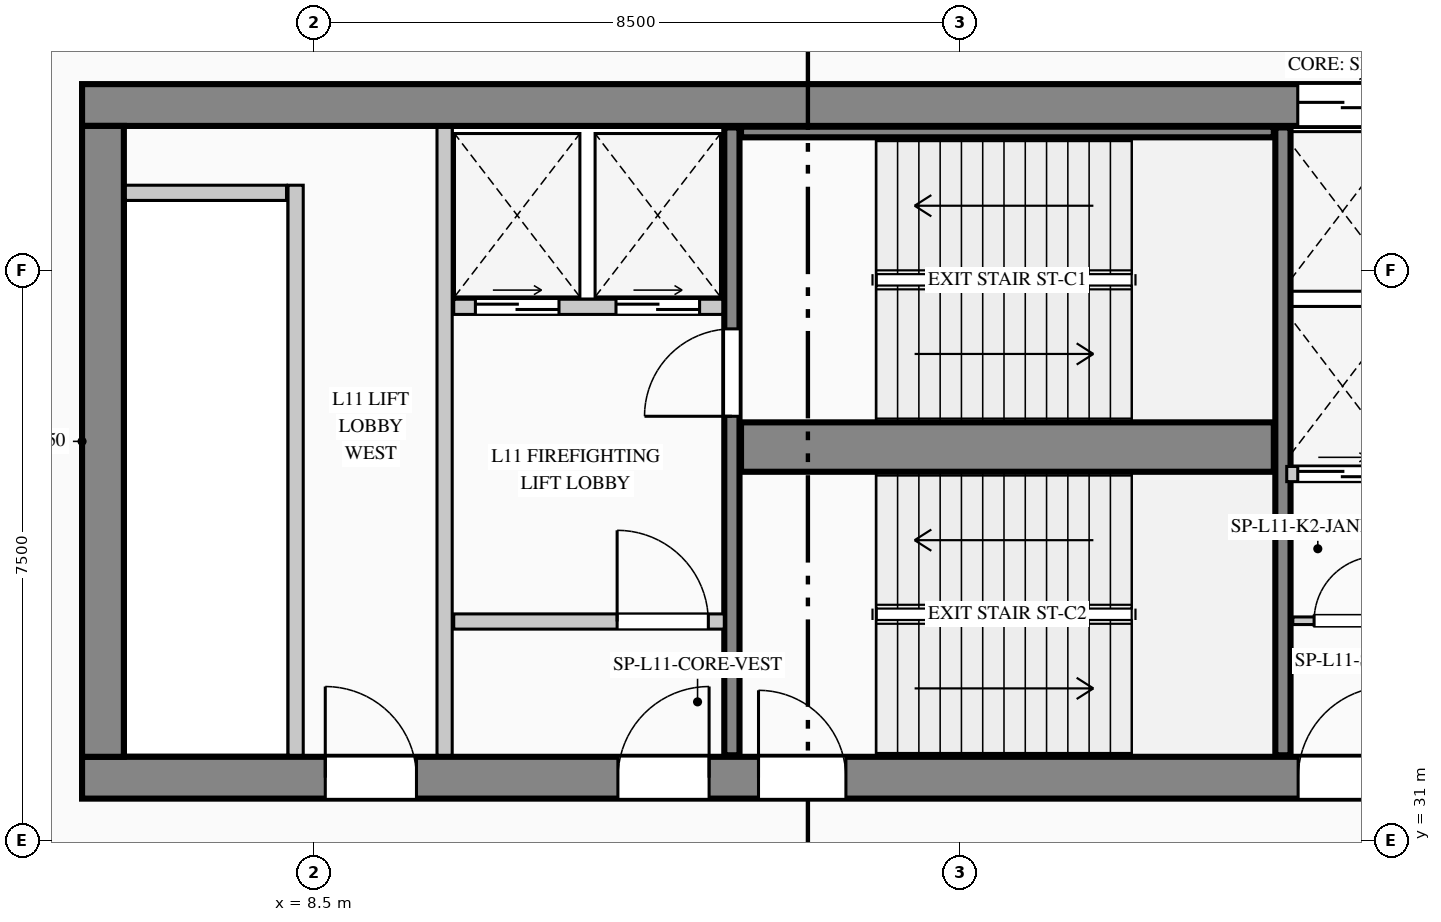
"""IFC4 building model, lengths in metres.
Left out: names, types, materials, properties, quantities, classifications, styles, units other than length and angle.
Written with IfcOpenShell. Run it as: python <this file> out.ifc"""

import sys

from ifc_helpers import new_model, si_unit, direction, frame, frame_2d, origin, place, context, subcontext, project, spatial, rectangle, extrude, element, fill, save


model = new_model("IFC4")
c1 = context("Model", 3, precision=1e-05, world=origin(), true_north=direction((0.0, 1.0)))
c2 = subcontext(c1, "Body", "Model", "MODEL_VIEW")
j1 = project(units=[si_unit("LENGTHUNIT", "METRE"), si_unit("PLANEANGLEUNIT", "RADIAN")], contexts=[c1])
p1 = place(None, origin())
s1 = spatial("IfcSite", under=j1, at=p1, CompositionType="ELEMENT")
p2 = place(p1, origin())
s2 = spatial("IfcBuilding", under=s1, at=p2, CompositionType="ELEMENT")
p3 = place(p2, frame((0.0, 0.0, 49.0)))
s3 = spatial("IfcBuildingStorey", under=s2, at=p3, CompositionType="ELEMENT", Elevation=49.0)
p4 = place(p3, frame((5.45, 40.675, 0.0), z_axis=(0.0, 0.0, 1.0), x_axis=(1.0, 0.0, 0.0)))
e1 = element("IfcWall", 1, at=p4, inside=s3, PredefinedType="SHEAR", context=c2, shape_type="SweptSolid", body=[
    extrude(rectangle(XDim=17.95, YDim=0.55, at=frame_2d((8.975, 0.0))), origin(), (0.0, 0.0, 1.0), 4.4),
])
p5 = place(p4, frame((15.995, 0.0, 0.0)))
e2 = element("IfcOpeningElement", 2, at=p5, cuts=e1, PredefinedType="OPENING", context=c2, shape_type="SweptSolid", body=[
    extrude(rectangle(XDim=1.18, YDim=2.25, at=frame_2d((0.59, 1.125))), frame((0.0, 0.285, 0.0), z_axis=(0.0, -1.0, 0.0), x_axis=(1.0, 0.0, 0.0)), (0.0, 0.0, 1.0), 0.57),
])
p6 = place(p3, frame((5.45, 31.825, 0.0), z_axis=(0.0, 0.0, 1.0), x_axis=(1.0, 0.0, 0.0)))
e3 = element("IfcWall", 3, at=p6, inside=s3, PredefinedType="SHEAR", context=c2, shape_type="SweptSolid", body=[
    extrude(rectangle(XDim=17.95, YDim=0.55, at=frame_2d((8.975, 0.0))), origin(), (0.0, 0.0, 1.0), 4.4),
])
p7 = place(p6, frame((3.2, 0.0, 0.0)))
e4 = element("IfcOpeningElement", 4, at=p7, cuts=e3, PredefinedType="OPENING", context=c2, shape_type="SweptSolid", body=[
    extrude(rectangle(XDim=1.2, YDim=2.2, at=frame_2d((0.6, 1.1))), frame((0.0, 0.285, 0.0), z_axis=(0.0, -1.0, 0.0), x_axis=(1.0, 0.0, 0.0)), (0.0, 0.0, 1.0), 0.57),
])
p8 = place(p6, frame((7.05, 0.0, 0.0)))
e5 = element("IfcOpeningElement", 5, at=p8, cuts=e3, PredefinedType="OPENING", context=c2, shape_type="SweptSolid", body=[
    extrude(rectangle(XDim=1.2, YDim=2.2, at=frame_2d((0.6, 1.1))), frame((0.0, 0.285, 0.0), z_axis=(0.0, -1.0, 0.0), x_axis=(1.0, 0.0, 0.0)), (0.0, 0.0, 1.0), 0.57),
])
p9 = place(p6, frame((8.9, 0.0, 0.0)))
e6 = element("IfcOpeningElement", 6, at=p9, cuts=e3, PredefinedType="OPENING", context=c2, shape_type="SweptSolid", body=[
    extrude(rectangle(XDim=1.15, YDim=2.2, at=frame_2d((0.575, 1.1))), frame((0.0, 0.285, 0.0), z_axis=(0.0, -1.0, 0.0), x_axis=(1.0, 0.0, 0.0)), (0.0, 0.0, 1.0), 0.57),
])
p10 = place(p6, frame((16.0, 0.0, 0.0)))
e7 = element("IfcOpeningElement", 7, at=p10, cuts=e3, PredefinedType="OPENING", context=c2, shape_type="SweptSolid", body=[
    extrude(rectangle(XDim=1.2, YDim=2.2, at=frame_2d((0.6, 1.1))), frame((0.0, 0.285, 0.0), z_axis=(0.0, -1.0, 0.0), x_axis=(1.0, 0.0, 0.0)), (0.0, 0.0, 1.0), 0.57),
])
p11 = place(p3, frame((5.725, 32.1, 0.0), z_axis=(0.0, 0.0, 1.0), x_axis=(0.0, 1.0, 0.0)))
e8 = element("IfcWall", 8, at=p11, inside=s3, PredefinedType="SHEAR", context=c2, shape_type="SweptSolid", body=[
    extrude(rectangle(XDim=8.3, YDim=0.55, at=frame_2d((4.15, 0.0))), origin(), (0.0, 0.0, 1.0), 4.4),
])
p12 = place(p3, frame((14.0, 32.12, 0.0), z_axis=(0.0, 0.0, 1.0), x_axis=(0.0, 1.0, 0.0)))
e9 = element("IfcWall", 9, at=p12, inside=s3, PredefinedType="SHEAR", context=c2, shape_type="SweptSolid", body=[
    extrude(rectangle(XDim=8.26, YDim=0.2, at=frame_2d((4.13, 0.0))), origin(), (0.0, 0.0, 1.0), 4.4),
])
p13 = place(p12, frame((4.46, 0.0, 0.0)))
e10 = element("IfcOpeningElement", 10, at=p13, cuts=e9, PredefinedType="OPENING", context=c2, shape_type="SweptSolid", body=[
    extrude(rectangle(XDim=1.15, YDim=2.2, at=frame_2d((0.575, 1.1))), frame((0.0, 0.11, 0.0), z_axis=(0.0, -1.0, 0.0), x_axis=(1.0, 0.0, 0.0)), (0.0, 0.0, 1.0), 0.22),
])
p14 = place(p3, frame((14.12, 36.175, 0.0), z_axis=(0.0, 0.0, 1.0), x_axis=(1.0, 0.0, 0.0)))
e11 = element("IfcWall", 11, at=p14, inside=s3, PredefinedType="SHEAR", context=c2, shape_type="SweptSolid", body=[
    extrude(rectangle(XDim=7.01, YDim=0.65, at=frame_2d((3.505, 0.0))), origin(), (0.0, 0.0, 1.0), 4.4),
])
p15 = place(p3, frame((21.25, 32.12, 0.0), z_axis=(0.0, 0.0, 1.0), x_axis=(0.0, 1.0, 0.0)))
e12 = element("IfcWall", 12, at=p15, inside=s3, PredefinedType="SHEAR", context=c2, shape_type="SweptSolid", body=[
    extrude(rectangle(XDim=8.26, YDim=0.2, at=frame_2d((4.13, 0.0))), origin(), (0.0, 0.0, 1.0), 4.4),
])
p16 = place(p3, frame((14.12, 40.32, 0.0), z_axis=(0.0, 0.0, 1.0), x_axis=(1.0, 0.0, 0.0)))
e13 = element("IfcWall", 13, at=p16, inside=s3, PredefinedType="SHEAR", context=c2, shape_type="SweptSolid", body=[
    extrude(rectangle(XDim=7.01, YDim=0.14, at=frame_2d((3.505, 0.0))), origin(), (0.0, 0.0, 1.0), 4.4),
])
p17 = place(p3, frame((8.523, 4.84, 0.0), z_axis=(0.0, 0.0, 1.0), x_axis=(-0.150394554312, 0.988626055712, 0.0)))
e14 = element("IfcWall", 14, at=p17, inside=s3, PredefinedType="STANDARD", context=c2, shape_type="SweptSolid", body=[
    extrude(rectangle(XDim=36.738, YDim=0.28, at=frame_2d((18.369, 0.0))), origin(), (0.0, 0.0, 1.0), 4.1),
])
p18 = place(p17, frame((22.762, 0.0, 0.9)))
e15 = element("IfcOpeningElement", 15, at=p18, cuts=e14, PredefinedType="OPENING", context=c2, shape_type="SweptSolid", body=[
    extrude(rectangle(XDim=1.5, YDim=1.8, at=frame_2d((0.75, 0.9))), frame((0.0, 0.15, 0.0), z_axis=(0.0, -1.0, 0.0), x_axis=(1.0, 0.0, 0.0)), (0.0, 0.0, 1.0), 0.3),
])
p19 = place(p3, frame((8.26, 32.12, 0.0), z_axis=(0.0, 0.0, 1.0), x_axis=(0.0, 1.0, 0.0)))
e16 = element("IfcWall", 16, at=p19, inside=s3, PredefinedType="PARTITIONING", context=c2, shape_type="SweptSolid", body=[
    extrude(rectangle(XDim=7.5, YDim=0.2, at=frame_2d((3.75, 0.0))), origin(), (0.0, 0.0, 1.0), 4.1),
])
p20 = place(p3, frame((6.02, 39.52, 0.0), z_axis=(0.0, 0.0, 1.0), x_axis=(1.0, 0.0, 0.0)))
e17 = element("IfcWall", 17, at=p20, inside=s3, PredefinedType="PARTITIONING", context=c2, shape_type="SweptSolid", body=[
    extrude(rectangle(XDim=2.12, YDim=0.2, at=frame_2d((1.06, 0.0))), origin(), (0.0, 0.0, 1.0), 4.1),
])
p21 = place(p3, frame((10.22, 32.12, 0.0), z_axis=(0.0, 0.0, 1.0), x_axis=(0.0, 1.0, 0.0)))
e18 = element("IfcWall", 18, at=p21, inside=s3, PredefinedType="PARTITIONING", context=c2, shape_type="SweptSolid", body=[
    extrude(rectangle(XDim=8.26, YDim=0.2, at=frame_2d((4.13, 0.0))), origin(), (0.0, 0.0, 1.0), 4.1),
])
p22 = place(p3, frame((10.34, 38.02, 0.0), z_axis=(0.0, 0.0, 1.0), x_axis=(1.0, 0.0, 0.0)))
e19 = element("IfcWall", 19, at=p22, inside=s3, PredefinedType="PARTITIONING", context=c2, shape_type="SweptSolid", body=[
    extrude(rectangle(XDim=3.54, YDim=0.2, at=frame_2d((1.77, 0.0))), origin(), (0.0, 0.0, 1.0), 4.1),
])
p23 = place(p22, frame((0.285, 0.0, 0.0)))
e20 = element("IfcOpeningElement", 20, at=p23, cuts=e19, PredefinedType="OPENING", context=c2, shape_type="SweptSolid", body=[
    extrude(rectangle(XDim=1.1, YDim=2.2, at=frame_2d((0.55, 1.1))), frame((0.0, 0.11, 0.0), z_axis=(0.0, -1.0, 0.0), x_axis=(1.0, 0.0, 0.0)), (0.0, 0.0, 1.0), 0.22),
])
p24 = place(p22, frame((2.135, 0.0, 0.0)))
e21 = element("IfcOpeningElement", 21, at=p24, cuts=e19, PredefinedType="OPENING", context=c2, shape_type="SweptSolid", body=[
    extrude(rectangle(XDim=1.1, YDim=2.2, at=frame_2d((0.55, 1.1))), frame((0.0, 0.11, 0.0), z_axis=(0.0, -1.0, 0.0), x_axis=(1.0, 0.0, 0.0)), (0.0, 0.0, 1.0), 0.22),
])
p25 = place(p3, frame((10.34, 33.88, 0.0), z_axis=(0.0, 0.0, 1.0), x_axis=(1.0, 0.0, 0.0)))
e22 = element("IfcWall", 22, at=p25, inside=s3, PredefinedType="PARTITIONING", context=c2, shape_type="SweptSolid", body=[
    extrude(rectangle(XDim=3.56, YDim=0.2, at=frame_2d((1.78, 0.0))), origin(), (0.0, 0.0, 1.0), 4.1),
])
p26 = place(p25, frame((2.15, 0.0, 0.0)))
e23 = element("IfcOpeningElement", 23, at=p26, cuts=e22, PredefinedType="OPENING", context=c2, shape_type="SweptSolid", body=[
    extrude(rectangle(XDim=1.2, YDim=2.2, at=frame_2d((0.6, 1.1))), frame((0.0, 0.11, 0.0), z_axis=(0.0, -1.0, 0.0), x_axis=(1.0, 0.0, 0.0)), (0.0, 0.0, 1.0), 0.22),
])
p27 = place(p3, frame((21.38, 33.89, 0.0), z_axis=(0.0, 0.0, 1.0), x_axis=(1.0, 0.0, 0.0)))
e24 = element("IfcWall", 24, at=p27, inside=s3, PredefinedType="PARTITIONING", context=c2, shape_type="SweptSolid", body=[
    extrude(rectangle(XDim=1.42, YDim=0.1, at=frame_2d((0.71, 0.0))), origin(), (0.0, 0.0, 1.0), 4.1),
])
p28 = place(p27, frame((0.28, 0.0, 0.0)))
e25 = element("IfcOpeningElement", 25, at=p28, cuts=e24, PredefinedType="OPENING", context=c2, shape_type="SweptSolid", body=[
    extrude(rectangle(XDim=0.85, YDim=2.1, at=frame_2d((0.425, 1.05))), frame((0.0, 0.06, 0.0), z_axis=(0.0, -1.0, 0.0), x_axis=(1.0, 0.0, 0.0)), (0.0, 0.0, 1.0), 0.12),
])
p29 = place(p3, frame((21.3, 35.82, 0.0), z_axis=(0.0, 0.0, 1.0), x_axis=(1.0, 0.0, 0.0)))
e26 = element("IfcWall", 26, at=p29, inside=s3, PredefinedType="PARTITIONING", context=c2, shape_type="SweptSolid", body=[
    extrude(rectangle(XDim=1.5, YDim=0.2, at=frame_2d((0.75, 0.0))), origin(), (0.0, 0.0, 1.0), 4.1),
])
p30 = place(p29, frame((0.145, 0.0, 0.0)))
e27 = element("IfcOpeningElement", 27, at=p30, cuts=e26, PredefinedType="OPENING", context=c2, shape_type="SweptSolid", body=[
    extrude(rectangle(XDim=1.18, YDim=2.25, at=frame_2d((0.59, 1.125))), frame((0.0, 0.11, 0.0), z_axis=(0.0, -1.0, 0.0), x_axis=(1.0, 0.0, 0.0)), (0.0, 0.0, 1.0), 0.22),
])
p31 = place(p7, origin())
e28 = element("IfcDoor", 28, at=p31, inside=s3, OperationType="SINGLE_SWING_LEFT", PredefinedType="DOOR", context=c2, shape_type="SweptSolid", body=[
    extrude(rectangle(XDim=1.2, YDim=2.2, at=frame_2d((0.6, 1.1))), frame((0.0, 0.025, 0.0), z_axis=(0.0, -1.0, 0.0), x_axis=(1.0, 0.0, 0.0)), (0.0, 0.0, 1.0), 0.05),
])
fill(e4, e28)
p32 = place(p8, origin())
e29 = element("IfcDoor", 29, at=p32, inside=s3, OperationType="SINGLE_SWING_RIGHT", PredefinedType="DOOR", context=c2, shape_type="SweptSolid", body=[
    extrude(rectangle(XDim=1.2, YDim=2.2, at=frame_2d((0.6, 1.1))), frame((0.0, 0.025, 0.0), z_axis=(0.0, -1.0, 0.0), x_axis=(1.0, 0.0, 0.0)), (0.0, 0.0, 1.0), 0.05),
])
fill(e5, e29)
p33 = place(p9, origin())
e30 = element("IfcDoor", 30, at=p33, inside=s3, OperationType="SINGLE_SWING_LEFT", PredefinedType="DOOR", context=c2, shape_type="SweptSolid", body=[
    extrude(rectangle(XDim=1.15, YDim=2.2, at=frame_2d((0.575, 1.1))), frame((0.0, 0.025, 0.0), z_axis=(0.0, -1.0, 0.0), x_axis=(1.0, 0.0, 0.0)), (0.0, 0.0, 1.0), 0.05),
])
fill(e6, e30)
p34 = place(p10, origin())
e31 = element("IfcDoor", 31, at=p34, inside=s3, OperationType="SINGLE_SWING_RIGHT", PredefinedType="DOOR", context=c2, shape_type="SweptSolid", body=[
    extrude(rectangle(XDim=1.2, YDim=2.2, at=frame_2d((0.6, 1.1))), frame((0.0, 0.025, 0.0), z_axis=(0.0, -1.0, 0.0), x_axis=(1.0, 0.0, 0.0)), (0.0, 0.0, 1.0), 0.05),
])
fill(e7, e31)
p35 = place(p26, origin())
e32 = element("IfcDoor", 32, at=p35, inside=s3, OperationType="SINGLE_SWING_LEFT", PredefinedType="DOOR", context=c2, shape_type="SweptSolid", body=[
    extrude(rectangle(XDim=1.2, YDim=2.2, at=frame_2d((0.6, 1.1))), frame((0.0, 0.025, 0.0), z_axis=(0.0, -1.0, 0.0), x_axis=(1.0, 0.0, 0.0)), (0.0, 0.0, 1.0), 0.05),
])
fill(e23, e32)
p36 = place(p28, origin())
e33 = element("IfcDoor", 33, at=p36, inside=s3, OperationType="SINGLE_SWING_RIGHT", PredefinedType="DOOR", context=c2, shape_type="SweptSolid", body=[
    extrude(rectangle(XDim=0.85, YDim=2.1, at=frame_2d((0.425, 1.05))), frame((0.0, 0.025, 0.0), z_axis=(0.0, -1.0, 0.0), x_axis=(1.0, 0.0, 0.0)), (0.0, 0.0, 1.0), 0.05),
])
fill(e25, e33)
p37 = place(p13, origin())
e34 = element("IfcDoor", 34, at=p37, inside=s3, OperationType="SINGLE_SWING_LEFT", PredefinedType="DOOR", context=c2, shape_type="SweptSolid", body=[
    extrude(rectangle(XDim=1.15, YDim=2.2, at=frame_2d((0.575, 1.1))), frame((0.0, 0.025, 0.0), z_axis=(0.0, -1.0, 0.0), x_axis=(1.0, 0.0, 0.0)), (0.0, 0.0, 1.0), 0.05),
])
fill(e10, e34)
p38 = place(p23, origin())
e35 = element("IfcDoor", 35, at=p38, inside=s3, OperationType="DOUBLE_DOOR_SLIDING", PredefinedType="DOOR", context=c2, shape_type="SweptSolid", body=[
    extrude(rectangle(XDim=1.1, YDim=2.2, at=frame_2d((0.55, 1.1))), frame((0.0, 0.025, 0.0), z_axis=(0.0, -1.0, 0.0), x_axis=(1.0, 0.0, 0.0)), (0.0, 0.0, 1.0), 0.05),
])
fill(e20, e35)
p39 = place(p24, origin())
e36 = element("IfcDoor", 36, at=p39, inside=s3, OperationType="DOUBLE_DOOR_SLIDING", PredefinedType="DOOR", context=c2, shape_type="SweptSolid", body=[
    extrude(rectangle(XDim=1.1, YDim=2.2, at=frame_2d((0.55, 1.1))), frame((0.0, 0.025, 0.0), z_axis=(0.0, -1.0, 0.0), x_axis=(1.0, 0.0, 0.0)), (0.0, 0.0, 1.0), 0.05),
])
fill(e21, e36)
p40 = place(p5, origin())
e37 = element("IfcDoor", 37, at=p40, inside=s3, OperationType="DOUBLE_DOOR_SLIDING", PredefinedType="DOOR", context=c2, shape_type="SweptSolid", body=[
    extrude(rectangle(XDim=1.18, YDim=2.25, at=frame_2d((0.59, 1.125))), frame((0.0, 0.025, 0.0), z_axis=(0.0, -1.0, 0.0), x_axis=(1.0, 0.0, 0.0)), (0.0, 0.0, 1.0), 0.05),
])
fill(e2, e37)
p41 = place(p30, origin())
e38 = element("IfcDoor", 38, at=p41, inside=s3, OperationType="DOUBLE_DOOR_SLIDING", PredefinedType="DOOR", context=c2, shape_type="SweptSolid", body=[
    extrude(rectangle(XDim=1.18, YDim=2.25, at=frame_2d((0.59, 1.125))), frame((0.0, 0.025, 0.0), z_axis=(0.0, -1.0, 0.0), x_axis=(1.0, 0.0, 0.0)), (0.0, 0.0, 1.0), 0.05),
])
fill(e27, e38)
save(model, sys.argv[1])
